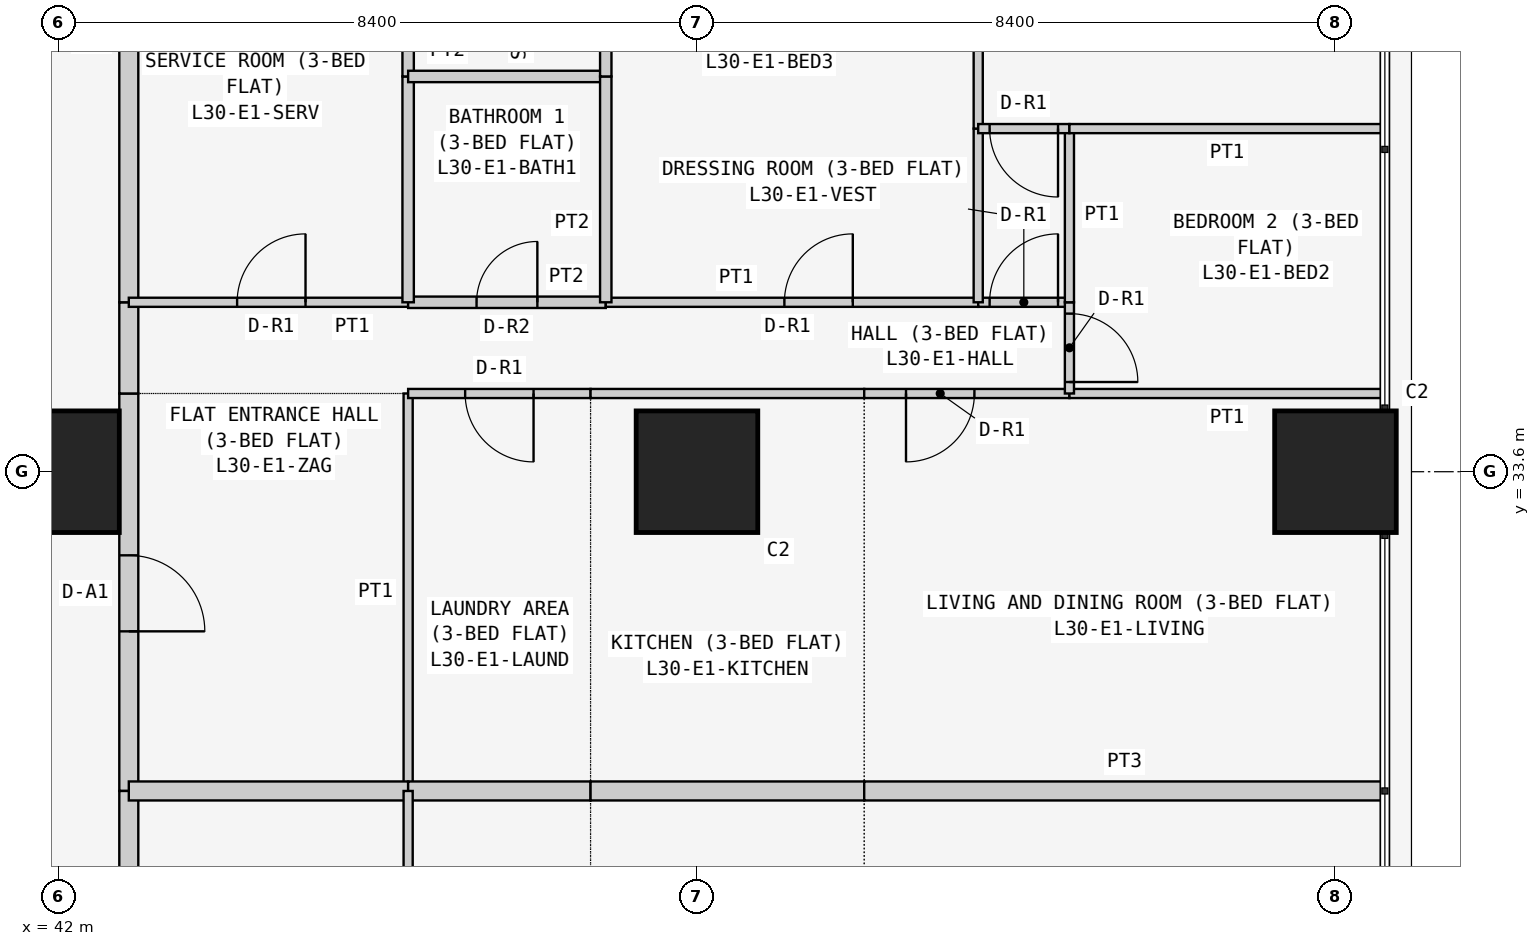
"""IFC4 building model, lengths in metres.
Left out: names, types, materials, properties, quantities, classifications, styles, units other than length and angle.
Written with IfcOpenShell. Run it as: python <this file> out.ifc"""

import sys

from ifc_helpers import new_model, si_unit, direction, frame, frame_2d, origin, origin_2d, place, context, subcontext, project, spatial, rectangle, extrude, element, fill, save


model = new_model("IFC4")
c1 = context("Model", 3, precision=1e-05, world=origin(), true_north=direction((0.0, 1.0)))
c2 = subcontext(c1, "Body", "Model", "MODEL_VIEW")
j1 = project(units=[si_unit("LENGTHUNIT", "METRE"), si_unit("PLANEANGLEUNIT", "RADIAN")], contexts=[c1])
p1 = place(None, origin())
s1 = spatial("IfcSite", under=j1, at=p1, CompositionType="ELEMENT")
p2 = place(p1, origin())
s2 = spatial("IfcBuilding", under=s1, at=p2, CompositionType="ELEMENT")
p3 = place(p2, frame((0.0, 0.0, 119.7)))
s3 = spatial("IfcBuildingStorey", under=s2, at=p3, CompositionType="ELEMENT", Elevation=119.7)
for number, where, z_axis, x_axis in (
    (1, (42.0, 33.6, 0.0), (0.0, 0.0, 1.0), (1.0, 0.0, 0.0)),
    (2, (50.4, 33.6, 0.0), (0.0, 0.0, 1.0), (1.0, 0.0, 0.0)),
    (3, (58.8, 33.6, 0.0), (0.0, 0.0, 1.0), (1.0, 0.0, 0.0)),
):
    element("IfcColumn", number, at=place(p3, frame(where, z_axis=z_axis, x_axis=x_axis)), inside=s3, PredefinedType="COLUMN", context=c2, shape_type="SweptSolid", body=[
        extrude(rectangle(XDim=1.6, YDim=1.6, at=origin_2d()), origin(), (0.0, 0.0, 1.0), 3.6),
    ])
p4 = place(p3, frame((42.925, 34.629, 0.0), z_axis=(0.0, 0.0, 1.0), x_axis=(0.0, -1.0, 0.0)))
e4 = element("IfcWall", 4, at=p4, inside=s3, PredefinedType="PARTITIONING", context=c2, shape_type="SweptSolid", body=[
    extrude(rectangle(XDim=5.229, YDim=0.25, at=frame_2d((2.615, 0.0))), origin(), (0.0, 0.0, 1.0), 3.45),
])
p5 = place(p4, frame((2.129, 0.0, 0.0)))
e5 = element("IfcOpeningElement", 5, at=p5, cuts=e4, PredefinedType="OPENING", context=c2, shape_type="SweptSolid", body=[
    extrude(rectangle(XDim=1.0, YDim=2.1, at=frame_2d((0.5, 1.05))), frame((0.0, 0.135, 0.0), z_axis=(0.0, -1.0, 0.0), x_axis=(1.0, 0.0, 0.0)), (0.0, 0.0, 1.0), 0.27),
])
p6 = place(p3, frame((42.925, 35.829, 0.0), z_axis=(0.0, 0.0, 1.0), x_axis=(0.0, -1.0, 0.0)))
e6 = element("IfcWall", 6, at=p6, inside=s3, PredefinedType="PARTITIONING", context=c2, shape_type="SweptSolid", body=[
    extrude(rectangle(XDim=1.2, YDim=0.25, at=frame_2d((0.6, 0.0))), origin(), (0.0, 0.0, 1.0), 3.45),
])
p7 = place(p3, frame((42.925, 42.7, 0.0), z_axis=(0.0, 0.0, 1.0), x_axis=(0.0, -1.0, 0.0)))
e7 = element("IfcWall", 7, at=p7, inside=s3, PredefinedType="PARTITIONING", context=c2, shape_type="SweptSolid", body=[
    extrude(rectangle(XDim=6.871, YDim=0.25, at=frame_2d((3.436, 0.0))), origin(), (0.0, 0.0, 1.0), 3.45),
])
p8 = place(p3, frame((42.925, 29.4, 0.0), z_axis=(0.0, 0.0, 1.0), x_axis=(0.0, -1.0, 0.0)))
e8 = element("IfcWall", 8, at=p8, inside=s3, PredefinedType="PARTITIONING", context=c2, shape_type="SweptSolid", body=[
    extrude(rectangle(XDim=5.229, YDim=0.25, at=frame_2d((2.615, 0.0))), origin(), (0.0, 0.0, 1.0), 3.45),
])
p9 = place(p8, frame((2.1, 0.0, 0.0)))
e9 = element("IfcOpeningElement", 9, at=p9, cuts=e8, PredefinedType="OPENING", context=c2, shape_type="SweptSolid", body=[
    extrude(rectangle(XDim=1.0, YDim=2.1, at=frame_2d((0.5, 1.05))), frame((0.0, 0.135, 0.0), z_axis=(0.0, -1.0, 0.0), x_axis=(1.0, 0.0, 0.0)), (0.0, 0.0, 1.0), 0.27),
])
p10 = place(p3, frame((46.6, 29.4, 0.0), z_axis=(0.0, 0.0, 1.0), x_axis=(0.0, 1.0, 0.0)))
e10 = element("IfcWall", 10, at=p10, inside=s3, PredefinedType="PARTITIONING", context=c2, shape_type="SweptSolid", body=[
    extrude(rectangle(XDim=5.229, YDim=0.12, at=frame_2d((2.615, 0.0))), origin(), (0.0, 0.0, 1.0), 3.45),
])
p11 = place(p3, frame((42.925, 29.4, 0.0), z_axis=(0.0, 0.0, 1.0), x_axis=(1.0, 0.0, 0.0)))
e11 = element("IfcWall", 11, at=p11, inside=s3, PredefinedType="PARTITIONING", context=c2, shape_type="SweptSolid", body=[
    extrude(rectangle(XDim=3.675, YDim=0.25, at=frame_2d((1.837, 0.0))), origin(), (0.0, 0.0, 1.0), 3.45),
])
p12 = place(p3, frame((49.0, 34.629, 0.0), z_axis=(0.0, 0.0, 1.0), x_axis=(-1.0, 0.0, 0.0)))
e12 = element("IfcWall", 12, at=p12, inside=s3, PredefinedType="PARTITIONING", context=c2, shape_type="SweptSolid", body=[
    extrude(rectangle(XDim=2.4, YDim=0.12, at=frame_2d((1.2, 0.0))), origin(), (0.0, 0.0, 1.0), 3.45),
])
p13 = place(p12, frame((0.75, 0.0, 0.0)))
e13 = element("IfcOpeningElement", 13, at=p13, cuts=e12, PredefinedType="OPENING", context=c2, shape_type="SweptSolid", body=[
    extrude(rectangle(XDim=0.9, YDim=2.1, at=frame_2d((0.45, 1.05))), frame((0.0, 0.07, 0.0), z_axis=(0.0, -1.0, 0.0), x_axis=(1.0, 0.0, 0.0)), (0.0, 0.0, 1.0), 0.14),
])
p14 = place(p3, frame((46.6, 29.4, 0.0), z_axis=(0.0, 0.0, 1.0), x_axis=(1.0, 0.0, 0.0)))
e14 = element("IfcWall", 14, at=p14, inside=s3, PredefinedType="PARTITIONING", context=c2, shape_type="SweptSolid", body=[
    extrude(rectangle(XDim=2.4, YDim=0.25, at=frame_2d((1.2, 0.0))), origin(), (0.0, 0.0, 1.0), 3.45),
])
p15 = place(p3, frame((52.6, 34.629, 0.0), z_axis=(0.0, 0.0, 1.0), x_axis=(-1.0, 0.0, 0.0)))
e15 = element("IfcWall", 15, at=p15, inside=s3, PredefinedType="PARTITIONING", context=c2, shape_type="SweptSolid", body=[
    extrude(rectangle(XDim=3.6, YDim=0.12, at=frame_2d((1.8, 0.0))), origin(), (0.0, 0.0, 1.0), 3.45),
])
p16 = place(p3, frame((49.0, 29.4, 0.0), z_axis=(0.0, 0.0, 1.0), x_axis=(1.0, 0.0, 0.0)))
e16 = element("IfcWall", 16, at=p16, inside=s3, PredefinedType="PARTITIONING", context=c2, shape_type="SweptSolid", body=[
    extrude(rectangle(XDim=3.6, YDim=0.25, at=frame_2d((1.8, 0.0))), origin(), (0.0, 0.0, 1.0), 3.45),
])
p17 = place(p3, frame((55.3, 34.629, 0.0), z_axis=(0.0, 0.0, 1.0), x_axis=(-1.0, 0.0, 0.0)))
e17 = element("IfcWall", 17, at=p17, inside=s3, PredefinedType="PARTITIONING", context=c2, shape_type="SweptSolid", body=[
    extrude(rectangle(XDim=2.7, YDim=0.12, at=frame_2d((1.35, 0.0))), origin(), (0.0, 0.0, 1.0), 3.45),
])
p18 = place(p17, frame((1.25, 0.0, 0.0)))
e18 = element("IfcOpeningElement", 18, at=p18, cuts=e17, PredefinedType="OPENING", context=c2, shape_type="SweptSolid", body=[
    extrude(rectangle(XDim=0.9, YDim=2.1, at=frame_2d((0.45, 1.05))), frame((0.0, 0.07, 0.0), z_axis=(0.0, -1.0, 0.0), x_axis=(1.0, 0.0, 0.0)), (0.0, 0.0, 1.0), 0.14),
])
p19 = place(p3, frame((59.45, 34.629, 0.0), z_axis=(0.0, 0.0, 1.0), x_axis=(-1.0, 0.0, 0.0)))
e19 = element("IfcWall", 19, at=p19, inside=s3, PredefinedType="PARTITIONING", context=c2, shape_type="SweptSolid", body=[
    extrude(rectangle(XDim=4.15, YDim=0.12, at=frame_2d((2.075, 0.0))), origin(), (0.0, 0.0, 1.0), 3.45),
])
p20 = place(p3, frame((52.6, 29.4, 0.0), z_axis=(0.0, 0.0, 1.0), x_axis=(1.0, 0.0, 0.0)))
e20 = element("IfcWall", 20, at=p20, inside=s3, PredefinedType="PARTITIONING", context=c2, shape_type="SweptSolid", body=[
    extrude(rectangle(XDim=6.85, YDim=0.25, at=frame_2d((3.425, 0.0))), origin(), (0.0, 0.0, 1.0), 3.45),
])
p21 = place(p3, frame((46.6, 35.829, 0.0), z_axis=(0.0, 0.0, 1.0), x_axis=(-1.0, 0.0, 0.0)))
e21 = element("IfcWall", 21, at=p21, inside=s3, PredefinedType="PARTITIONING", context=c2, shape_type="SweptSolid", body=[
    extrude(rectangle(XDim=3.675, YDim=0.12, at=frame_2d((1.837, 0.0))), origin(), (0.0, 0.0, 1.0), 3.45),
])
p22 = place(p21, frame((1.35, 0.0, 0.0)))
e22 = element("IfcOpeningElement", 22, at=p22, cuts=e21, PredefinedType="OPENING", context=c2, shape_type="SweptSolid", body=[
    extrude(rectangle(XDim=0.9, YDim=2.1, at=frame_2d((0.45, 1.05))), frame((0.0, 0.07, 0.0), z_axis=(0.0, -1.0, 0.0), x_axis=(1.0, 0.0, 0.0)), (0.0, 0.0, 1.0), 0.14),
])
p23 = place(p3, frame((49.2, 35.829, 0.0), z_axis=(0.0, 0.0, 1.0), x_axis=(-1.0, 0.0, 0.0)))
e23 = element("IfcWall", 23, at=p23, inside=s3, PredefinedType="PARTITIONING", context=c2, shape_type="SweptSolid", body=[
    extrude(rectangle(XDim=2.6, YDim=0.15, at=frame_2d((1.3, 0.0))), origin(), (0.0, 0.0, 1.0), 3.45),
])
p24 = place(p23, frame((0.9, 0.0, 0.0)))
e24 = element("IfcOpeningElement", 24, at=p24, cuts=e23, PredefinedType="OPENING", context=c2, shape_type="SweptSolid", body=[
    extrude(rectangle(XDim=0.8, YDim=2.1, at=frame_2d((0.4, 1.05))), frame((0.0, 0.085, 0.0), z_axis=(0.0, -1.0, 0.0), x_axis=(1.0, 0.0, 0.0)), (0.0, 0.0, 1.0), 0.17),
])
p25 = place(p3, frame((54.1, 35.829, 0.0), z_axis=(0.0, 0.0, 1.0), x_axis=(-1.0, 0.0, 0.0)))
e25 = element("IfcWall", 25, at=p25, inside=s3, PredefinedType="PARTITIONING", context=c2, shape_type="SweptSolid", body=[
    extrude(rectangle(XDim=4.9, YDim=0.12, at=frame_2d((2.45, 0.0))), origin(), (0.0, 0.0, 1.0), 3.45),
])
p26 = place(p25, frame((1.65, 0.0, 0.0)))
e26 = element("IfcOpeningElement", 26, at=p26, cuts=e25, PredefinedType="OPENING", context=c2, shape_type="SweptSolid", body=[
    extrude(rectangle(XDim=0.9, YDim=2.1, at=frame_2d((0.45, 1.05))), frame((0.0, 0.07, 0.0), z_axis=(0.0, -1.0, 0.0), x_axis=(1.0, 0.0, 0.0)), (0.0, 0.0, 1.0), 0.14),
])
p27 = place(p3, frame((55.3, 35.829, 0.0), z_axis=(0.0, 0.0, 1.0), x_axis=(-1.0, 0.0, 0.0)))
e27 = element("IfcWall", 27, at=p27, inside=s3, PredefinedType="PARTITIONING", context=c2, shape_type="SweptSolid", body=[
    extrude(rectangle(XDim=1.2, YDim=0.12, at=frame_2d((0.6, 0.0))), origin(), (0.0, 0.0, 1.0), 3.45),
])
p28 = place(p27, frame((0.15, 0.0, 0.0)))
e28 = element("IfcOpeningElement", 28, at=p28, cuts=e27, PredefinedType="OPENING", context=c2, shape_type="SweptSolid", body=[
    extrude(rectangle(XDim=0.9, YDim=2.1, at=frame_2d((0.45, 1.05))), frame((0.0, 0.07, 0.0), z_axis=(0.0, -1.0, 0.0), x_axis=(1.0, 0.0, 0.0)), (0.0, 0.0, 1.0), 0.14),
])
p29 = place(p3, frame((55.3, 34.629, 0.0), z_axis=(0.0, 0.0, 1.0), x_axis=(0.0, 1.0, 0.0)))
e29 = element("IfcWall", 29, at=p29, inside=s3, PredefinedType="PARTITIONING", context=c2, shape_type="SweptSolid", body=[
    extrude(rectangle(XDim=1.2, YDim=0.12, at=frame_2d((0.6, 0.0))), origin(), (0.0, 0.0, 1.0), 3.45),
])
p30 = place(p29, frame((0.151, 0.0, 0.0)))
e30 = element("IfcOpeningElement", 30, at=p30, cuts=e29, PredefinedType="OPENING", context=c2, shape_type="SweptSolid", body=[
    extrude(rectangle(XDim=0.9, YDim=2.1, at=frame_2d((0.45, 1.05))), frame((0.0, 0.07, 0.0), z_axis=(0.0, -1.0, 0.0), x_axis=(1.0, 0.0, 0.0)), (0.0, 0.0, 1.0), 0.14),
])
p31 = place(p3, frame((46.6, 35.829, 0.0), z_axis=(0.0, 0.0, 1.0), x_axis=(0.0, 1.0, 0.0)))
e31 = element("IfcWall", 31, at=p31, inside=s3, PredefinedType="PARTITIONING", context=c2, shape_type="SweptSolid", body=[
    extrude(rectangle(XDim=2.971, YDim=0.15, at=frame_2d((1.485, 0.0))), origin(), (0.0, 0.0, 1.0), 3.45),
])
p32 = place(p3, frame((46.6, 38.8, 0.0), z_axis=(0.0, 0.0, 1.0), x_axis=(0.0, 1.0, 0.0)))
e32 = element("IfcWall", 32, at=p32, inside=s3, PredefinedType="PARTITIONING", context=c2, shape_type="SweptSolid", body=[
    extrude(rectangle(XDim=3.9, YDim=0.15, at=frame_2d((1.95, 0.0))), origin(), (0.0, 0.0, 1.0), 3.45),
])
p33 = place(p32, frame((1.45, 0.0, 0.0)))
e33 = element("IfcOpeningElement", 33, at=p33, cuts=e32, PredefinedType="OPENING", context=c2, shape_type="SweptSolid", body=[
    extrude(rectangle(XDim=0.8, YDim=2.1, at=frame_2d((0.4, 1.05))), frame((0.0, 0.085, 0.0), z_axis=(0.0, -1.0, 0.0), x_axis=(1.0, 0.0, 0.0)), (0.0, 0.0, 1.0), 0.17),
])
p34 = place(p3, frame((49.2, 38.8, 0.0), z_axis=(0.0, 0.0, 1.0), x_axis=(-1.0, 0.0, 0.0)))
e34 = element("IfcWall", 34, at=p34, inside=s3, PredefinedType="PARTITIONING", context=c2, shape_type="SweptSolid", body=[
    extrude(rectangle(XDim=2.6, YDim=0.15, at=frame_2d((1.3, 0.0))), origin(), (0.0, 0.0, 1.0), 3.45),
])
p35 = place(p3, frame((49.2, 35.829, 0.0), z_axis=(0.0, 0.0, 1.0), x_axis=(0.0, 1.0, 0.0)))
e35 = element("IfcWall", 35, at=p35, inside=s3, PredefinedType="PARTITIONING", context=c2, shape_type="SweptSolid", body=[
    extrude(rectangle(XDim=2.971, YDim=0.15, at=frame_2d((1.485, 0.0))), origin(), (0.0, 0.0, 1.0), 3.45),
])
p36 = place(p3, frame((49.2, 38.8, 0.0), z_axis=(0.0, 0.0, 1.0), x_axis=(0.0, 1.0, 0.0)))
e36 = element("IfcWall", 36, at=p36, inside=s3, PredefinedType="PARTITIONING", context=c2, shape_type="SweptSolid", body=[
    extrude(rectangle(XDim=3.9, YDim=0.15, at=frame_2d((1.95, 0.0))), origin(), (0.0, 0.0, 1.0), 3.45),
])
p37 = place(p3, frame((54.1, 35.829, 0.0), z_axis=(0.0, 0.0, 1.0), x_axis=(0.0, 1.0, 0.0)))
e37 = element("IfcWall", 37, at=p37, inside=s3, PredefinedType="PARTITIONING", context=c2, shape_type="SweptSolid", body=[
    extrude(rectangle(XDim=2.285, YDim=0.12, at=frame_2d((1.143, 0.0))), origin(), (0.0, 0.0, 1.0), 3.45),
])
p38 = place(p3, frame((54.1, 38.114, 0.0), z_axis=(0.0, 0.0, 1.0), x_axis=(0.0, 1.0, 0.0)))
e38 = element("IfcWall", 38, at=p38, inside=s3, PredefinedType="PARTITIONING", context=c2, shape_type="SweptSolid", body=[
    extrude(rectangle(XDim=4.586, YDim=0.12, at=frame_2d((2.293, 0.0))), origin(), (0.0, 0.0, 1.0), 3.45),
])
p39 = place(p3, frame((55.3, 35.829, 0.0), z_axis=(0.0, 0.0, 1.0), x_axis=(0.0, 1.0, 0.0)))
e39 = element("IfcWall", 39, at=p39, inside=s3, PredefinedType="PARTITIONING", context=c2, shape_type="SweptSolid", body=[
    extrude(rectangle(XDim=2.285, YDim=0.12, at=frame_2d((1.143, 0.0))), origin(), (0.0, 0.0, 1.0), 3.45),
])
p40 = place(p3, frame((55.3, 38.114, 0.0), z_axis=(0.0, 0.0, 1.0), x_axis=(-1.0, 0.0, 0.0)))
e40 = element("IfcWall", 40, at=p40, inside=s3, PredefinedType="PARTITIONING", context=c2, shape_type="SweptSolid", body=[
    extrude(rectangle(XDim=1.2, YDim=0.12, at=frame_2d((0.6, 0.0))), origin(), (0.0, 0.0, 1.0), 3.45),
])
p41 = place(p40, frame((0.15, 0.0, 0.0)))
e41 = element("IfcOpeningElement", 41, at=p41, cuts=e40, PredefinedType="OPENING", context=c2, shape_type="SweptSolid", body=[
    extrude(rectangle(XDim=0.9, YDim=2.1, at=frame_2d((0.45, 1.05))), frame((0.0, 0.07, 0.0), z_axis=(0.0, -1.0, 0.0), x_axis=(1.0, 0.0, 0.0)), (0.0, 0.0, 1.0), 0.14),
])
p42 = place(p3, frame((59.45, 38.114, 0.0), z_axis=(0.0, 0.0, 1.0), x_axis=(-1.0, 0.0, 0.0)))
e42 = element("IfcWall", 42, at=p42, inside=s3, PredefinedType="PARTITIONING", context=c2, shape_type="SweptSolid", body=[
    extrude(rectangle(XDim=4.15, YDim=0.12, at=frame_2d((2.075, 0.0))), origin(), (0.0, 0.0, 1.0), 3.45),
])
p43 = place(p3, frame((46.6, 29.4, 0.0), z_axis=(0.0, 0.0, 1.0), x_axis=(0.0, -1.0, 0.0)))
e43 = element("IfcWall", 43, at=p43, inside=s3, PredefinedType="PARTITIONING", context=c2, shape_type="SweptSolid", body=[
    extrude(rectangle(XDim=5.229, YDim=0.12, at=frame_2d((2.615, 0.0))), origin(), (0.0, 0.0, 1.0), 3.45),
])
p44 = place(p5, origin())
e44 = element("IfcDoor", 44, at=p44, inside=s3, OperationType="SINGLE_SWING_RIGHT", PredefinedType="DOOR", context=c2, shape_type="SweptSolid", body=[
    extrude(rectangle(XDim=1.0, YDim=2.1, at=frame_2d((0.5, 1.05))), frame((0.0, 0.025, 0.0), z_axis=(0.0, -1.0, 0.0), x_axis=(1.0, 0.0, 0.0)), (0.0, 0.0, 1.0), 0.05),
])
fill(e5, e44)
p45 = place(p13, origin())
e45 = element("IfcDoor", 45, at=p45, inside=s3, OperationType="SINGLE_SWING_LEFT", PredefinedType="DOOR", context=c2, shape_type="SweptSolid", body=[
    extrude(rectangle(XDim=0.9, YDim=2.1, at=frame_2d((0.45, 1.05))), frame((0.0, 0.025, 0.0), z_axis=(0.0, -1.0, 0.0), x_axis=(1.0, 0.0, 0.0)), (0.0, 0.0, 1.0), 0.05),
])
fill(e13, e45)
p46 = place(p18, origin())
e46 = element("IfcDoor", 46, at=p46, inside=s3, OperationType="SINGLE_SWING_RIGHT", PredefinedType="DOOR", context=c2, shape_type="SweptSolid", body=[
    extrude(rectangle(XDim=0.9, YDim=2.1, at=frame_2d((0.45, 1.05))), frame((0.0, 0.025, 0.0), z_axis=(0.0, -1.0, 0.0), x_axis=(1.0, 0.0, 0.0)), (0.0, 0.0, 1.0), 0.05),
])
fill(e18, e46)
p47 = place(p22, frame((0.9, 0.0, 0.0), z_axis=(0.0, 0.0, 1.0), x_axis=(-1.0, 0.0, 0.0)))
e47 = element("IfcDoor", 47, at=p47, inside=s3, OperationType="SINGLE_SWING_RIGHT", PredefinedType="DOOR", context=c2, shape_type="SweptSolid", body=[
    extrude(rectangle(XDim=0.9, YDim=2.1, at=frame_2d((0.45, 1.05))), frame((0.0, 0.025, 0.0), z_axis=(0.0, -1.0, 0.0), x_axis=(1.0, 0.0, 0.0)), (0.0, 0.0, 1.0), 0.05),
])
fill(e22, e47)
p48 = place(p24, frame((0.8, 0.0, 0.0), z_axis=(0.0, 0.0, 1.0), x_axis=(-1.0, 0.0, 0.0)))
e48 = element("IfcDoor", 48, at=p48, inside=s3, OperationType="SINGLE_SWING_RIGHT", PredefinedType="DOOR", context=c2, shape_type="SweptSolid", body=[
    extrude(rectangle(XDim=0.8, YDim=2.1, at=frame_2d((0.4, 1.05))), frame((0.0, 0.025, 0.0), z_axis=(0.0, -1.0, 0.0), x_axis=(1.0, 0.0, 0.0)), (0.0, 0.0, 1.0), 0.05),
])
fill(e24, e48)
p49 = place(p26, frame((0.9, 0.0, 0.0), z_axis=(0.0, 0.0, 1.0), x_axis=(-1.0, 0.0, 0.0)))
e49 = element("IfcDoor", 49, at=p49, inside=s3, OperationType="SINGLE_SWING_RIGHT", PredefinedType="DOOR", context=c2, shape_type="SweptSolid", body=[
    extrude(rectangle(XDim=0.9, YDim=2.1, at=frame_2d((0.45, 1.05))), frame((0.0, 0.025, 0.0), z_axis=(0.0, -1.0, 0.0), x_axis=(1.0, 0.0, 0.0)), (0.0, 0.0, 1.0), 0.05),
])
fill(e26, e49)
p50 = place(p28, frame((0.9, 0.0, 0.0), z_axis=(0.0, 0.0, 1.0), x_axis=(-1.0, 0.0, 0.0)))
e50 = element("IfcDoor", 50, at=p50, inside=s3, OperationType="SINGLE_SWING_RIGHT", PredefinedType="DOOR", context=c2, shape_type="SweptSolid", body=[
    extrude(rectangle(XDim=0.9, YDim=2.1, at=frame_2d((0.45, 1.05))), frame((0.0, 0.025, 0.0), z_axis=(0.0, -1.0, 0.0), x_axis=(1.0, 0.0, 0.0)), (0.0, 0.0, 1.0), 0.05),
])
fill(e28, e50)
p51 = place(p41, origin())
e51 = element("IfcDoor", 51, at=p51, inside=s3, OperationType="SINGLE_SWING_LEFT", PredefinedType="DOOR", context=c2, shape_type="SweptSolid", body=[
    extrude(rectangle(XDim=0.9, YDim=2.1, at=frame_2d((0.45, 1.05))), frame((0.0, 0.025, 0.0), z_axis=(0.0, -1.0, 0.0), x_axis=(1.0, 0.0, 0.0)), (0.0, 0.0, 1.0), 0.05),
])
fill(e41, e51)
p52 = place(p30, frame((0.9, 0.0, 0.0), z_axis=(0.0, 0.0, 1.0), x_axis=(-1.0, 0.0, 0.0)))
e52 = element("IfcDoor", 52, at=p52, inside=s3, OperationType="SINGLE_SWING_RIGHT", PredefinedType="DOOR", context=c2, shape_type="SweptSolid", body=[
    extrude(rectangle(XDim=0.9, YDim=2.1, at=frame_2d((0.45, 1.05))), frame((0.0, 0.025, 0.0), z_axis=(0.0, -1.0, 0.0), x_axis=(1.0, 0.0, 0.0)), (0.0, 0.0, 1.0), 0.05),
])
fill(e30, e52)
save(model, sys.argv[1])
